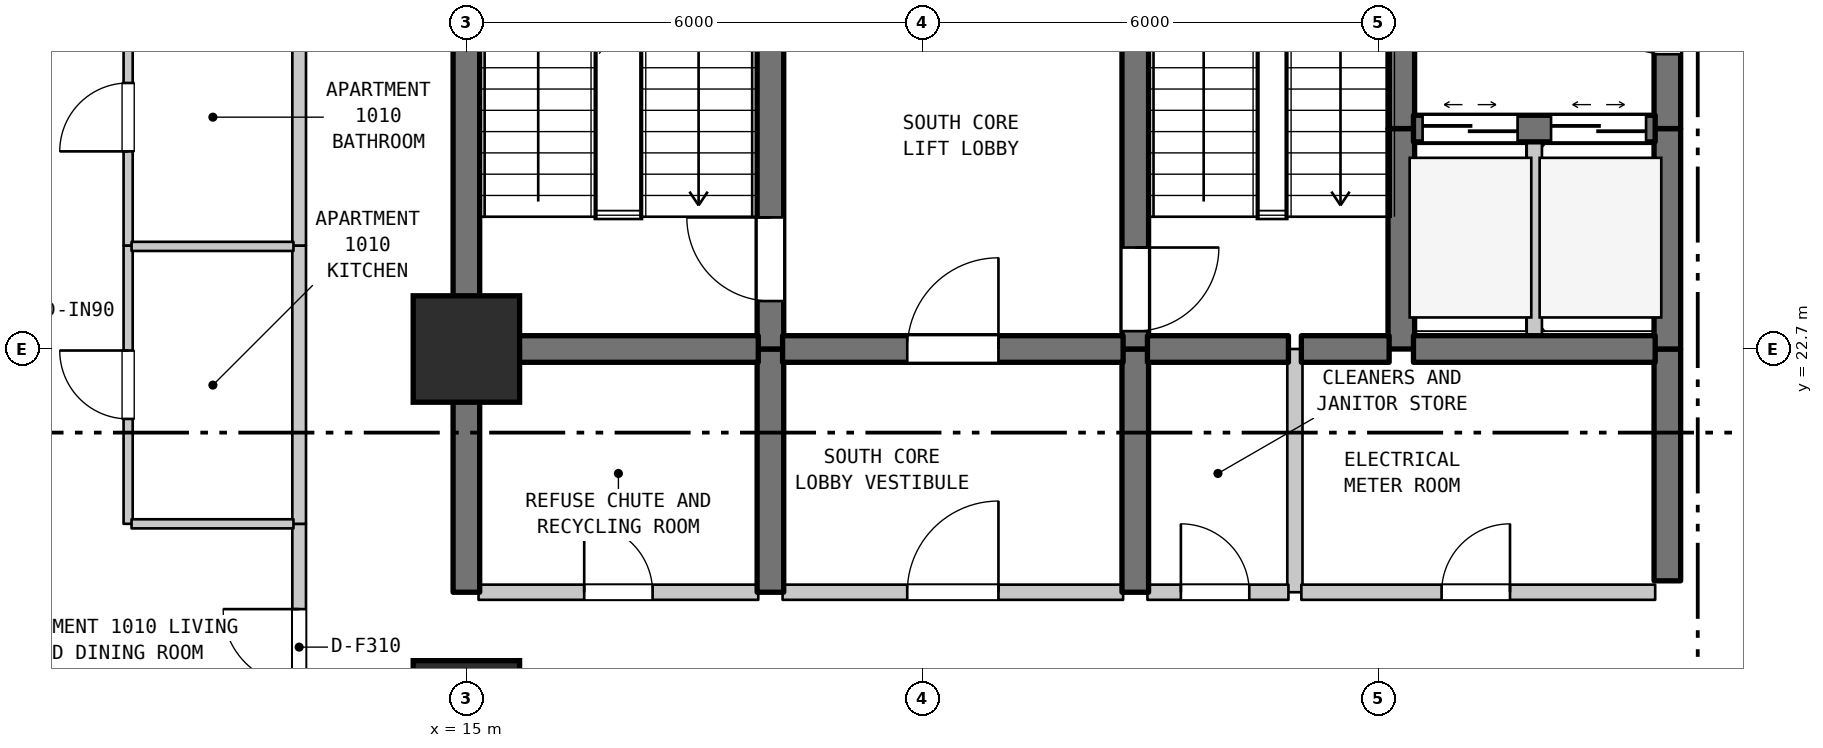
"""IFC4 building model, lengths in metres.
Left out: names, types, materials, properties, quantities, classifications, styles, units other than length and angle.
Written with IfcOpenShell. Run it as: python <this file> out.ifc"""

import sys

from ifc_helpers import new_model, si_unit, direction, frame, frame_2d, origin, origin_2d, place, context, subcontext, project, spatial, rectangle, extrude, element, fill, save


model = new_model("IFC4")
c1 = context("Model", 3, precision=1e-05, world=origin(), true_north=direction((0.0, 1.0)))
c2 = subcontext(c1, "Body", "Model", "MODEL_VIEW")
j1 = project(units=[si_unit("LENGTHUNIT", "METRE"), si_unit("PLANEANGLEUNIT", "RADIAN")], contexts=[c1])
p1 = place(None, origin())
s1 = spatial("IfcSite", under=j1, at=p1, CompositionType="ELEMENT")
p2 = place(p1, origin())
s2 = spatial("IfcBuilding", under=s1, at=p2, CompositionType="ELEMENT")
p3 = place(p2, frame((0.0, 0.0, 46.2)))
s3 = spatial("IfcBuildingStorey", under=s2, at=p3, CompositionType="ELEMENT", Elevation=46.2)
for number, where, z_axis, x_axis in (
    (1, (15.0, 17.9, 0.0), (0.0, 0.0, 1.0), (1.0, 0.0, 0.0)),
    (2, (15.0, 22.7, 0.0), (0.0, 0.0, 1.0), (1.0, 0.0, 0.0)),
):
    element("IfcColumn", number, at=place(p3, frame(where, z_axis=z_axis, x_axis=x_axis)), inside=s3, PredefinedType="COLUMN", context=c2, shape_type="SweptSolid", body=[
        extrude(rectangle(XDim=1.4, YDim=1.4, at=origin_2d()), origin(), (0.0, 0.0, 1.0), 3.7),
    ])
p4 = place(p3, frame((10.55, 20.4, 0.0), z_axis=(0.0, 0.0, 1.0), x_axis=(0.0, 1.0, 0.0)))
e3 = element("IfcWall", 3, at=p4, inside=s3, PredefinedType="PARTITIONING", context=c2, shape_type="SweptSolid", body=[
    extrude(rectangle(XDim=3.661, YDim=0.12, at=frame_2d((1.831, 0.0))), origin(), (0.0, 0.0, 1.0), 3.385),
])
p5 = place(p4, frame((1.38, 0.0, 0.0)))
e4 = element("IfcOpeningElement", 4, at=p5, cuts=e3, PredefinedType="OPENING", context=c2, shape_type="SweptSolid", body=[
    extrude(rectangle(XDim=0.9, YDim=2.15, at=frame_2d((0.45, 1.075))), frame((0.0, 0.07, 0.0), z_axis=(0.0, -1.0, 0.0), x_axis=(1.0, 0.0, 0.0)), (0.0, 0.0, 1.0), 0.14),
])
p6 = place(p3, frame((10.55, 24.061, 0.0), z_axis=(0.0, 0.0, 1.0), x_axis=(0.0, 1.0, 0.0)))
e5 = element("IfcWall", 5, at=p6, inside=s3, PredefinedType="PARTITIONING", context=c2, shape_type="SweptSolid", body=[
    extrude(rectangle(XDim=3.379, YDim=0.12, at=frame_2d((1.689, 0.0))), origin(), (0.0, 0.0, 1.0), 3.385),
])
p7 = place(p6, frame((1.239, 0.0, 0.0)))
e6 = element("IfcOpeningElement", 6, at=p7, cuts=e5, PredefinedType="OPENING", context=c2, shape_type="SweptSolid", body=[
    extrude(rectangle(XDim=0.9, YDim=2.1, at=frame_2d((0.45, 1.05))), frame((0.0, 0.07, 0.0), z_axis=(0.0, -1.0, 0.0), x_axis=(1.0, 0.0, 0.0)), (0.0, 0.0, 1.0), 0.14),
])
p8 = place(p3, frame((12.8, 17.3, 0.0), z_axis=(0.0, 0.0, 1.0), x_axis=(0.0, 1.0, 0.0)))
e7 = element("IfcWall", 7, at=p8, inside=s3, PredefinedType="STANDARD", context=c2, shape_type="SweptSolid", body=[
    extrude(rectangle(XDim=3.1, YDim=0.18, at=frame_2d((1.55, 0.0))), origin(), (0.0, 0.0, 1.0), 3.385),
])
p9 = place(p8, frame((0.978, 0.0, 0.0)))
e8 = element("IfcOpeningElement", 8, at=p9, cuts=e7, PredefinedType="OPENING", context=c2, shape_type="SweptSolid", body=[
    extrude(rectangle(XDim=1.0, YDim=2.15, at=frame_2d((0.5, 1.075))), frame((0.0, 0.1, 0.0), z_axis=(0.0, -1.0, 0.0), x_axis=(1.0, 0.0, 0.0)), (0.0, 0.0, 1.0), 0.2),
])
p10 = place(p3, frame((12.8, 20.4, 0.0), z_axis=(0.0, 0.0, 1.0), x_axis=(0.0, 1.0, 0.0)))
e9 = element("IfcWall", 9, at=p10, inside=s3, PredefinedType="STANDARD", context=c2, shape_type="SweptSolid", body=[
    extrude(rectangle(XDim=3.661, YDim=0.18, at=frame_2d((1.831, 0.0))), origin(), (0.0, 0.0, 1.0), 3.385),
])
p11 = place(p3, frame((12.8, 24.061, 0.0), z_axis=(0.0, 0.0, 1.0), x_axis=(0.0, 1.0, 0.0)))
e10 = element("IfcWall", 10, at=p11, inside=s3, PredefinedType="STANDARD", context=c2, shape_type="SweptSolid", body=[
    extrude(rectangle(XDim=3.379, YDim=0.18, at=frame_2d((1.689, 0.0))), origin(), (0.0, 0.0, 1.0), 3.385),
])
p12 = place(p3, frame((15.0, 19.5, 0.0), z_axis=(0.0, 0.0, 1.0), x_axis=(0.0, 1.0, 0.0)))
e11 = element("IfcWall", 11, at=p12, inside=s3, PredefinedType="SHEAR", context=c2, shape_type="SweptSolid", body=[
    extrude(rectangle(XDim=3.2, YDim=0.35, at=frame_2d((1.6, 0.0))), origin(), (0.0, 0.0, 1.0), 3.385),
])
p13 = place(p3, frame((15.0, 22.7, 0.0), z_axis=(0.0, 0.0, 1.0), x_axis=(0.0, 1.0, 0.0)))
e12 = element("IfcWall", 12, at=p13, inside=s3, PredefinedType="SHEAR", context=c2, shape_type="SweptSolid", body=[
    extrude(rectangle(XDim=6.8, YDim=0.35, at=frame_2d((3.4, 0.0))), origin(), (0.0, 0.0, 1.0), 3.385),
])
p14 = place(p3, frame((19.0, 19.5, 0.0), z_axis=(0.0, 0.0, 1.0), x_axis=(0.0, 1.0, 0.0)))
e13 = element("IfcWall", 13, at=p14, inside=s3, PredefinedType="SHEAR", context=c2, shape_type="SweptSolid", body=[
    extrude(rectangle(XDim=3.2, YDim=0.35, at=frame_2d((1.6, 0.0))), origin(), (0.0, 0.0, 1.0), 3.385),
])
p15 = place(p3, frame((19.0, 22.7, 0.0), z_axis=(0.0, 0.0, 1.0), x_axis=(0.0, 1.0, 0.0)))
e14 = element("IfcWall", 14, at=p15, inside=s3, PredefinedType="SHEAR", context=c2, shape_type="SweptSolid", body=[
    extrude(rectangle(XDim=5.5, YDim=0.35, at=frame_2d((2.75, 0.0))), origin(), (0.0, 0.0, 1.0), 3.385),
])
p16 = place(p15, frame((0.631, 0.0, 0.0)))
e15 = element("IfcOpeningElement", 15, at=p16, cuts=e14, PredefinedType="OPENING", context=c2, shape_type="SweptSolid", body=[
    extrude(rectangle(XDim=1.1, YDim=2.15, at=frame_2d((0.55, 1.075))), frame((0.0, 0.185, 0.0), z_axis=(0.0, -1.0, 0.0), x_axis=(1.0, 0.0, 0.0)), (0.0, 0.0, 1.0), 0.37),
])
p17 = place(p3, frame((23.8, 19.5, 0.0), z_axis=(0.0, 0.0, 1.0), x_axis=(0.0, 1.0, 0.0)))
e16 = element("IfcWall", 16, at=p17, inside=s3, PredefinedType="SHEAR", context=c2, shape_type="SweptSolid", body=[
    extrude(rectangle(XDim=3.2, YDim=0.35, at=frame_2d((1.6, 0.0))), origin(), (0.0, 0.0, 1.0), 3.385),
])
p18 = place(p3, frame((23.8, 22.7, 0.0), z_axis=(0.0, 0.0, 1.0), x_axis=(0.0, 1.0, 0.0)))
e17 = element("IfcWall", 17, at=p18, inside=s3, PredefinedType="SHEAR", context=c2, shape_type="SweptSolid", body=[
    extrude(rectangle(XDim=5.5, YDim=0.35, at=frame_2d((2.75, 0.0))), origin(), (0.0, 0.0, 1.0), 3.385),
])
p19 = place(p18, frame((0.235, 0.0, 0.0)))
e18 = element("IfcOpeningElement", 18, at=p19, cuts=e17, PredefinedType="OPENING", context=c2, shape_type="SweptSolid", body=[
    extrude(rectangle(XDim=1.1, YDim=2.15, at=frame_2d((0.55, 1.075))), frame((0.0, 0.185, 0.0), z_axis=(0.0, -1.0, 0.0), x_axis=(1.0, 0.0, 0.0)), (0.0, 0.0, 1.0), 0.37),
])
p20 = place(p3, frame((25.9, 19.5, 0.0), z_axis=(0.0, 0.0, 1.0), x_axis=(0.0, 1.0, 0.0)))
e19 = element("IfcWall", 19, at=p20, inside=s3, PredefinedType="STANDARD", context=c2, shape_type="SweptSolid", body=[
    extrude(rectangle(XDim=3.2, YDim=0.2, at=frame_2d((1.6, 0.0))), origin(), (0.0, 0.0, 1.0), 3.385),
])
p21 = place(p3, frame((27.3, 22.7, 0.0), z_axis=(0.0, 0.0, 1.0), x_axis=(0.0, 1.0, 0.0)))
e20 = element("IfcWall", 20, at=p21, inside=s3, PredefinedType="SHEAR", context=c2, shape_type="SweptSolid", body=[
    extrude(rectangle(XDim=2.9, YDim=0.35, at=frame_2d((1.45, 0.0))), origin(), (0.0, 0.0, 1.0), 3.385),
])
p22 = place(p3, frame((27.3, 25.6, 0.0), z_axis=(0.0, 0.0, 1.0), x_axis=(0.0, 1.0, 0.0)))
e21 = element("IfcWall", 21, at=p22, inside=s3, PredefinedType="SHEAR", context=c2, shape_type="SweptSolid", body=[
    extrude(rectangle(XDim=3.3, YDim=0.35, at=frame_2d((1.65, 0.0))), origin(), (0.0, 0.0, 1.0), 3.385),
])
p23 = place(p3, frame((29.05, 22.7, 0.0), z_axis=(0.0, 0.0, 1.0), x_axis=(0.0, 1.0, 0.0)))
e22 = element("IfcWall", 22, at=p23, inside=s3, PredefinedType="STANDARD", context=c2, shape_type="SweptSolid", body=[
    extrude(rectangle(XDim=2.9, YDim=0.2, at=frame_2d((1.45, 0.0))), origin(), (0.0, 0.0, 1.0), 3.385),
])
p24 = place(p3, frame((30.8, 19.65, 0.0), z_axis=(0.0, 0.0, 1.0), x_axis=(0.0, 1.0, 0.0)))
e23 = element("IfcWall", 23, at=p24, inside=s3, PredefinedType="SHEAR", context=c2, shape_type="SweptSolid", body=[
    extrude(rectangle(XDim=3.05, YDim=0.35, at=frame_2d((1.525, 0.0))), origin(), (0.0, 0.0, 1.0), 3.385),
])
p25 = place(p3, frame((30.8, 22.7, 0.0), z_axis=(0.0, 0.0, 1.0), x_axis=(0.0, 1.0, 0.0)))
e24 = element("IfcWall", 24, at=p25, inside=s3, PredefinedType="SHEAR", context=c2, shape_type="SweptSolid", body=[
    extrude(rectangle(XDim=2.9, YDim=0.35, at=frame_2d((1.45, 0.0))), origin(), (0.0, 0.0, 1.0), 3.385),
])
p26 = place(p3, frame((30.8, 25.6, 0.0), z_axis=(0.0, 0.0, 1.0), x_axis=(0.0, 1.0, 0.0)))
e25 = element("IfcWall", 25, at=p26, inside=s3, PredefinedType="SHEAR", context=c2, shape_type="SweptSolid", body=[
    extrude(rectangle(XDim=3.3, YDim=0.35, at=frame_2d((1.65, 0.0))), origin(), (0.0, 0.0, 1.0), 3.385),
])
p27 = place(p26, frame((0.978, 0.0, 0.0)))
e26 = element("IfcOpeningElement", 26, at=p27, cuts=e25, PredefinedType="OPENING", context=c2, shape_type="SweptSolid", body=[
    extrude(rectangle(XDim=1.2, YDim=2.2, at=frame_2d((0.6, 1.1))), frame((0.0, 0.185, 0.0), z_axis=(0.0, -1.0, 0.0), x_axis=(1.0, 0.0, 0.0)), (0.0, 0.0, 1.0), 0.37),
])
p28 = place(p3, frame((15.16, 19.5, 0.0), z_axis=(0.0, 0.0, 1.0), x_axis=(1.0, 0.0, 0.0)))
e27 = element("IfcWall", 27, at=p28, inside=s3, PredefinedType="STANDARD", context=c2, shape_type="SweptSolid", body=[
    extrude(rectangle(XDim=3.68, YDim=0.2, at=frame_2d((1.84, 0.0))), origin(), (0.0, 0.0, 1.0), 3.385),
])
p29 = place(p28, frame((1.39, 0.0, 0.0)))
e28 = element("IfcOpeningElement", 28, at=p29, cuts=e27, PredefinedType="OPENING", context=c2, shape_type="SweptSolid", body=[
    extrude(rectangle(XDim=0.9, YDim=2.15, at=frame_2d((0.45, 1.075))), frame((0.0, 0.11, 0.0), z_axis=(0.0, -1.0, 0.0), x_axis=(1.0, 0.0, 0.0)), (0.0, 0.0, 1.0), 0.22),
])
p30 = place(p3, frame((19.16, 19.5, 0.0), z_axis=(0.0, 0.0, 1.0), x_axis=(1.0, 0.0, 0.0)))
e29 = element("IfcWall", 29, at=p30, inside=s3, PredefinedType="STANDARD", context=c2, shape_type="SweptSolid", body=[
    extrude(rectangle(XDim=4.48, YDim=0.2, at=frame_2d((2.24, 0.0))), origin(), (0.0, 0.0, 1.0), 3.385),
])
p31 = place(p30, frame((1.64, 0.0, 0.0)))
e30 = element("IfcOpeningElement", 30, at=p31, cuts=e29, PredefinedType="OPENING", context=c2, shape_type="SweptSolid", body=[
    extrude(rectangle(XDim=1.2, YDim=2.2, at=frame_2d((0.6, 1.1))), frame((0.0, 0.11, 0.0), z_axis=(0.0, -1.0, 0.0), x_axis=(1.0, 0.0, 0.0)), (0.0, 0.0, 1.0), 0.22),
])
p32 = place(p3, frame((23.96, 19.5, 0.0), z_axis=(0.0, 0.0, 1.0), x_axis=(1.0, 0.0, 0.0)))
e31 = element("IfcWall", 31, at=p32, inside=s3, PredefinedType="STANDARD", context=c2, shape_type="SweptSolid", body=[
    extrude(rectangle(XDim=1.855, YDim=0.2, at=frame_2d((0.927, 0.0))), origin(), (0.0, 0.0, 1.0), 3.385),
])
p33 = place(p32, frame((0.44, 0.0, 0.0)))
e32 = element("IfcOpeningElement", 32, at=p33, cuts=e31, PredefinedType="OPENING", context=c2, shape_type="SweptSolid", body=[
    extrude(rectangle(XDim=0.9, YDim=2.15, at=frame_2d((0.45, 1.075))), frame((0.0, 0.11, 0.0), z_axis=(0.0, -1.0, 0.0), x_axis=(1.0, 0.0, 0.0)), (0.0, 0.0, 1.0), 0.22),
])
p34 = place(p3, frame((25.985, 19.5, 0.0), z_axis=(0.0, 0.0, 1.0), x_axis=(1.0, 0.0, 0.0)))
e33 = element("IfcWall", 33, at=p34, inside=s3, PredefinedType="STANDARD", context=c2, shape_type="SweptSolid", body=[
    extrude(rectangle(XDim=4.655, YDim=0.2, at=frame_2d((2.327, 0.0))), origin(), (0.0, 0.0, 1.0), 3.385),
])
p35 = place(p34, frame((1.845, 0.0, 0.0)))
e34 = element("IfcOpeningElement", 34, at=p35, cuts=e33, PredefinedType="OPENING", context=c2, shape_type="SweptSolid", body=[
    extrude(rectangle(XDim=0.9, YDim=2.15, at=frame_2d((0.45, 1.075))), frame((0.0, 0.11, 0.0), z_axis=(0.0, -1.0, 0.0), x_axis=(1.0, 0.0, 0.0)), (0.0, 0.0, 1.0), 0.22),
])
p36 = place(p3, frame((10.595, 20.4, 0.0), z_axis=(0.0, 0.0, 1.0), x_axis=(1.0, 0.0, 0.0)))
e35 = element("IfcWall", 35, at=p36, inside=s3, PredefinedType="PARTITIONING", context=c2, shape_type="SweptSolid", body=[
    extrude(rectangle(XDim=2.13, YDim=0.12, at=frame_2d((1.065, 0.0))), origin(), (0.0, 0.0, 1.0), 3.385),
])
p37 = place(p3, frame((15.16, 22.7, 0.0), z_axis=(0.0, 0.0, 1.0), x_axis=(1.0, 0.0, 0.0)))
e36 = element("IfcWall", 36, at=p37, inside=s3, PredefinedType="SHEAR", context=c2, shape_type="SweptSolid", body=[
    extrude(rectangle(XDim=3.68, YDim=0.35, at=frame_2d((1.84, 0.0))), origin(), (0.0, 0.0, 1.0), 3.385),
])
p38 = place(p3, frame((19.16, 22.7, 0.0), z_axis=(0.0, 0.0, 1.0), x_axis=(1.0, 0.0, 0.0)))
e37 = element("IfcWall", 37, at=p38, inside=s3, PredefinedType="SHEAR", context=c2, shape_type="SweptSolid", body=[
    extrude(rectangle(XDim=4.48, YDim=0.35, at=frame_2d((2.24, 0.0))), origin(), (0.0, 0.0, 1.0), 3.385),
])
p39 = place(p38, frame((1.64, 0.0, 0.0)))
e38 = element("IfcOpeningElement", 38, at=p39, cuts=e37, PredefinedType="OPENING", context=c2, shape_type="SweptSolid", body=[
    extrude(rectangle(XDim=1.2, YDim=2.2, at=frame_2d((0.6, 1.1))), frame((0.0, 0.185, 0.0), z_axis=(0.0, -1.0, 0.0), x_axis=(1.0, 0.0, 0.0)), (0.0, 0.0, 1.0), 0.37),
])
p40 = place(p3, frame((23.96, 22.7, 0.0), z_axis=(0.0, 0.0, 1.0), x_axis=(1.0, 0.0, 0.0)))
e39 = element("IfcWall", 39, at=p40, inside=s3, PredefinedType="SHEAR", context=c2, shape_type="SweptSolid", body=[
    extrude(rectangle(XDim=1.855, YDim=0.35, at=frame_2d((0.927, 0.0))), origin(), (0.0, 0.0, 1.0), 3.385),
])
p41 = place(p3, frame((25.985, 22.7, 0.0), z_axis=(0.0, 0.0, 1.0), x_axis=(1.0, 0.0, 0.0)))
e40 = element("IfcWall", 40, at=p41, inside=s3, PredefinedType="SHEAR", context=c2, shape_type="SweptSolid", body=[
    extrude(rectangle(XDim=1.155, YDim=0.35, at=frame_2d((0.577, 0.0))), origin(), (0.0, 0.0, 1.0), 3.385),
])
p42 = place(p3, frame((27.46, 22.7, 0.0), z_axis=(0.0, 0.0, 1.0), x_axis=(1.0, 0.0, 0.0)))
e41 = element("IfcWall", 41, at=p42, inside=s3, PredefinedType="SHEAR", context=c2, shape_type="SweptSolid", body=[
    extrude(rectangle(XDim=3.18, YDim=0.35, at=frame_2d((1.59, 0.0))), origin(), (0.0, 0.0, 1.0), 3.385),
])
p43 = place(p3, frame((10.595, 24.05, 0.0), z_axis=(0.0, 0.0, 1.0), x_axis=(1.0, 0.0, 0.0)))
e42 = element("IfcWall", 42, at=p43, inside=s3, PredefinedType="PARTITIONING", context=c2, shape_type="SweptSolid", body=[
    extrude(rectangle(XDim=2.13, YDim=0.12, at=frame_2d((1.065, 0.0))), origin(), (0.0, 0.0, 1.0), 3.385),
])
p44 = place(p3, frame((27.46, 25.6, 0.0), z_axis=(0.0, 0.0, 1.0), x_axis=(1.0, 0.0, 0.0)))
e43 = element("IfcWall", 43, at=p44, inside=s3, PredefinedType="SHEAR", context=c2, shape_type="SweptSolid", body=[
    extrude(rectangle(XDim=3.18, YDim=0.35, at=frame_2d((1.59, 0.0))), origin(), (0.0, 0.0, 1.0), 3.385),
])
p45 = place(p44, frame((0.12, 0.0, 0.0)))
e44 = element("IfcOpeningElement", 44, at=p45, cuts=e43, PredefinedType="OPENING", context=c2, shape_type="SweptSolid", body=[
    extrude(rectangle(XDim=1.25, YDim=2.2, at=frame_2d((0.625, 1.1))), frame((0.0, 0.185, 0.0), z_axis=(0.0, -1.0, 0.0), x_axis=(1.0, 0.0, 0.0)), (0.0, 0.0, 1.0), 0.37),
])
p46 = place(p44, frame((1.81, 0.0, 0.0)))
e45 = element("IfcOpeningElement", 45, at=p46, cuts=e43, PredefinedType="OPENING", context=c2, shape_type="SweptSolid", body=[
    extrude(rectangle(XDim=1.25, YDim=2.2, at=frame_2d((0.625, 1.1))), frame((0.0, 0.185, 0.0), z_axis=(0.0, -1.0, 0.0), x_axis=(1.0, 0.0, 0.0)), (0.0, 0.0, 1.0), 0.37),
])
p47 = place(p5, origin())
e46 = element("IfcDoor", 46, at=p47, inside=s3, OperationType="SINGLE_SWING_RIGHT", PredefinedType="DOOR", context=c2, shape_type="SweptSolid", body=[
    extrude(rectangle(XDim=0.9, YDim=2.15, at=frame_2d((0.45, 1.075))), frame((0.0, 0.025, 0.0), z_axis=(0.0, -1.0, 0.0), x_axis=(1.0, 0.0, 0.0)), (0.0, 0.0, 1.0), 0.05),
])
fill(e4, e46)
p48 = place(p7, origin())
e47 = element("IfcDoor", 47, at=p48, inside=s3, OperationType="SINGLE_SWING_LEFT", PredefinedType="DOOR", context=c2, shape_type="SweptSolid", body=[
    extrude(rectangle(XDim=0.9, YDim=2.1, at=frame_2d((0.45, 1.05))), frame((0.0, 0.025, 0.0), z_axis=(0.0, -1.0, 0.0), x_axis=(1.0, 0.0, 0.0)), (0.0, 0.0, 1.0), 0.05),
])
fill(e6, e47)
p49 = place(p9, origin())
e48 = element("IfcDoor", 48, at=p49, inside=s3, OperationType="SINGLE_SWING_RIGHT", PredefinedType="DOOR", context=c2, shape_type="SweptSolid", body=[
    extrude(rectangle(XDim=1.0, YDim=2.15, at=frame_2d((0.5, 1.075))), frame((0.0, 0.025, 0.0), z_axis=(0.0, -1.0, 0.0), x_axis=(1.0, 0.0, 0.0)), (0.0, 0.0, 1.0), 0.05),
])
fill(e8, e48)
p50 = place(p16, origin())
e49 = element("IfcDoor", 49, at=p50, inside=s3, OperationType="SINGLE_SWING_RIGHT", PredefinedType="DOOR", context=c2, shape_type="SweptSolid", body=[
    extrude(rectangle(XDim=1.1, YDim=2.15, at=frame_2d((0.55, 1.075))), frame((0.0, 0.025, 0.0), z_axis=(0.0, -1.0, 0.0), x_axis=(1.0, 0.0, 0.0)), (0.0, 0.0, 1.0), 0.05),
])
fill(e15, e49)
p51 = place(p19, frame((1.1, 0.0, 0.0), z_axis=(0.0, 0.0, 1.0), x_axis=(-1.0, 0.0, 0.0)))
e50 = element("IfcDoor", 50, at=p51, inside=s3, OperationType="SINGLE_SWING_RIGHT", PredefinedType="DOOR", context=c2, shape_type="SweptSolid", body=[
    extrude(rectangle(XDim=1.1, YDim=2.15, at=frame_2d((0.55, 1.075))), frame((0.0, 0.025, 0.0), z_axis=(0.0, -1.0, 0.0), x_axis=(1.0, 0.0, 0.0)), (0.0, 0.0, 1.0), 0.05),
])
fill(e18, e50)
p52 = place(p27, origin())
e51 = element("IfcDoor", 51, at=p52, inside=s3, OperationType="SINGLE_SWING_RIGHT", PredefinedType="DOOR", context=c2, shape_type="SweptSolid", body=[
    extrude(rectangle(XDim=1.2, YDim=2.2, at=frame_2d((0.6, 1.1))), frame((0.0, 0.025, 0.0), z_axis=(0.0, -1.0, 0.0), x_axis=(1.0, 0.0, 0.0)), (0.0, 0.0, 1.0), 0.05),
])
fill(e26, e51)
p53 = place(p29, origin())
e52 = element("IfcDoor", 52, at=p53, inside=s3, OperationType="SINGLE_SWING_LEFT", PredefinedType="DOOR", context=c2, shape_type="SweptSolid", body=[
    extrude(rectangle(XDim=0.9, YDim=2.15, at=frame_2d((0.45, 1.075))), frame((0.0, 0.025, 0.0), z_axis=(0.0, -1.0, 0.0), x_axis=(1.0, 0.0, 0.0)), (0.0, 0.0, 1.0), 0.05),
])
fill(e28, e52)
p54 = place(p31, origin())
e53 = element("IfcDoor", 53, at=p54, inside=s3, OperationType="SINGLE_SWING_RIGHT", PredefinedType="DOOR", context=c2, shape_type="SweptSolid", body=[
    extrude(rectangle(XDim=1.2, YDim=2.2, at=frame_2d((0.6, 1.1))), frame((0.0, 0.025, 0.0), z_axis=(0.0, -1.0, 0.0), x_axis=(1.0, 0.0, 0.0)), (0.0, 0.0, 1.0), 0.05),
])
fill(e30, e53)
p55 = place(p33, origin())
e54 = element("IfcDoor", 54, at=p55, inside=s3, OperationType="SINGLE_SWING_LEFT", PredefinedType="DOOR", context=c2, shape_type="SweptSolid", body=[
    extrude(rectangle(XDim=0.9, YDim=2.15, at=frame_2d((0.45, 1.075))), frame((0.0, 0.025, 0.0), z_axis=(0.0, -1.0, 0.0), x_axis=(1.0, 0.0, 0.0)), (0.0, 0.0, 1.0), 0.05),
])
fill(e32, e54)
p56 = place(p35, origin())
e55 = element("IfcDoor", 55, at=p56, inside=s3, OperationType="SINGLE_SWING_RIGHT", PredefinedType="DOOR", context=c2, shape_type="SweptSolid", body=[
    extrude(rectangle(XDim=0.9, YDim=2.15, at=frame_2d((0.45, 1.075))), frame((0.0, 0.025, 0.0), z_axis=(0.0, -1.0, 0.0), x_axis=(1.0, 0.0, 0.0)), (0.0, 0.0, 1.0), 0.05),
])
fill(e34, e55)
p57 = place(p39, origin())
e56 = element("IfcDoor", 56, at=p57, inside=s3, OperationType="SINGLE_SWING_RIGHT", PredefinedType="DOOR", context=c2, shape_type="SweptSolid", body=[
    extrude(rectangle(XDim=1.2, YDim=2.2, at=frame_2d((0.6, 1.1))), frame((0.0, 0.025, 0.0), z_axis=(0.0, -1.0, 0.0), x_axis=(1.0, 0.0, 0.0)), (0.0, 0.0, 1.0), 0.05),
])
fill(e38, e56)
p58 = place(p45, origin())
e57 = element("IfcDoor", 57, at=p58, inside=s3, OperationType="DOUBLE_DOOR_SLIDING", PredefinedType="DOOR", context=c2, shape_type="SweptSolid", body=[
    extrude(rectangle(XDim=1.25, YDim=2.2, at=frame_2d((0.625, 1.1))), frame((0.0, 0.025, 0.0), z_axis=(0.0, -1.0, 0.0), x_axis=(1.0, 0.0, 0.0)), (0.0, 0.0, 1.0), 0.05),
])
fill(e44, e57)
p59 = place(p46, origin())
e58 = element("IfcDoor", 58, at=p59, inside=s3, OperationType="DOUBLE_DOOR_SLIDING", PredefinedType="DOOR", context=c2, shape_type="SweptSolid", body=[
    extrude(rectangle(XDim=1.25, YDim=2.2, at=frame_2d((0.625, 1.1))), frame((0.0, 0.025, 0.0), z_axis=(0.0, -1.0, 0.0), x_axis=(1.0, 0.0, 0.0)), (0.0, 0.0, 1.0), 0.05),
])
fill(e45, e58)
save(model, sys.argv[1])
